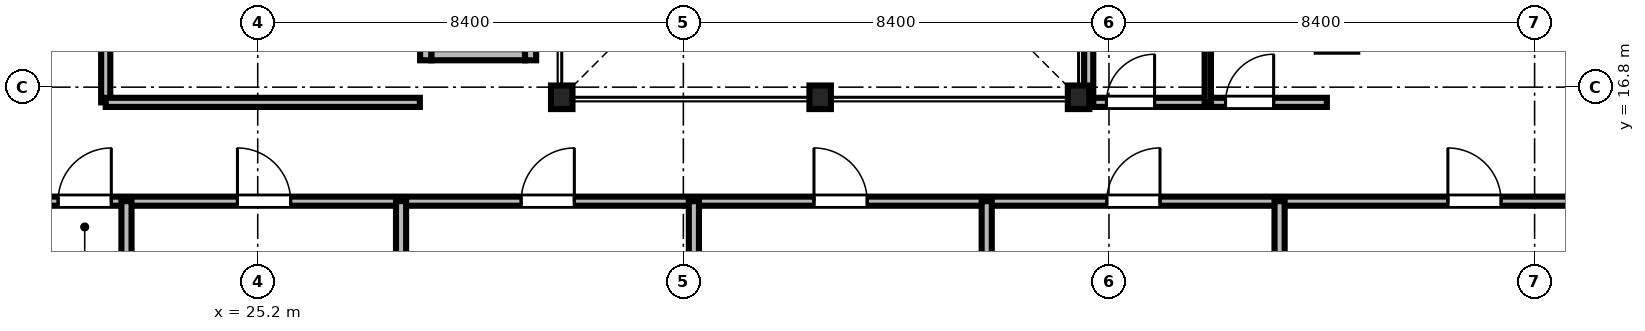
"""IFC4 building model, lengths in metres.
Left out: names, types, materials, properties, quantities, classifications, styles, units other than length and angle.
Written with IfcOpenShell. Run it as: python <this file> out.ifc"""

import sys

from ifc_helpers import new_model, si_unit, direction, frame, frame_2d, origin, origin_2d, place, context, subcontext, project, spatial, rectangle, i_section, extrude, source, transform, mapped, element, fill, save


model = new_model("IFC4")
c1 = context("Model", 3, precision=1e-05, world=origin(), true_north=direction((0.0, 1.0)))
c2 = subcontext(c1, "Body", "Model", "MODEL_VIEW")
j1 = project(units=[si_unit("LENGTHUNIT", "METRE"), si_unit("PLANEANGLEUNIT", "RADIAN")], contexts=[c1])
p1 = place(None, origin())
s1 = spatial("IfcSite", under=j1, at=p1, CompositionType="ELEMENT")
p2 = place(p1, origin())
s2 = spatial("IfcBuilding", under=s1, at=p2, CompositionType="ELEMENT")
p3 = place(p2, frame((0.0, 0.0, 148.3)))
s3 = spatial("IfcBuildingStorey", under=s2, at=p3, CompositionType="ELEMENT", Elevation=148.3)
m1 = source(origin(), c2, "Body", "SweptSolid", [
    extrude(i_section(OverallWidth=0.424, OverallDepth=0.465, WebThickness=0.035, FlangeThickness=0.056, FilletRadius=0.015, at=origin_2d()), origin(), (0.0, 0.0, 1.0), 3.46),
])
for number, where, z_axis, x_axis in (
    (1, (31.2, 16.6, 0.0), (0.0, 0.0, 1.0), (1.0, 0.0, 0.0)),
    (2, (36.3, 16.6, 0.0), (0.0, 0.0, 1.0), (1.0, 0.0, 0.0)),
    (3, (41.4, 16.6, 0.0), (0.0, 0.0, 1.0), (1.0, 0.0, 0.0)),
):
    element("IfcColumn", number, at=place(p3, frame(where, z_axis=z_axis, x_axis=x_axis)), inside=s3, PredefinedType="COLUMN", context=c2, shape_type="MappedRepresentation", body=[
        mapped(m1, transform((0.0, 0.0, 0.0), scale=1.0)),
    ])
m2 = source(origin(), c2, "Body", "SweptSolid", [
    extrude(rectangle(XDim=1.85, YDim=0.22, at=frame_2d((0.925, 0.0))), origin(), (0.0, 0.0, 1.0), 3.46),
])
p4 = place(p3, frame((28.625, 17.44, 0.0), z_axis=(0.0, 0.0, 1.0), x_axis=(1.0, 0.0, 0.0)))
e4 = element("IfcWall", 4, at=p4, inside=s3, PredefinedType="SOLIDWALL", context=c2, shape_type="MappedRepresentation", body=[
    mapped(m2, transform((0.0, 0.0, 0.0), scale=1.0)),
])
m3 = source(origin(), c2, "Body", "SweptSolid", [
    extrude(rectangle(XDim=2.54, YDim=0.22, at=frame_2d((1.27, 0.0))), origin(), (0.0, 0.0, 1.0), 3.46),
])
for number, where, z_axis, x_axis in (
    (5, (28.515, 17.33, 0.0), (0.0, 0.0, 1.0), (0.0, 1.0, 0.0)),
    (6, (30.585, 17.33, 0.0), (0.0, 0.0, 1.0), (0.0, 1.0, 0.0)),
):
    element("IfcWall", number, at=place(p3, frame(where, z_axis=z_axis, x_axis=x_axis)), inside=s3, PredefinedType="SOLIDWALL", context=c2, shape_type="MappedRepresentation", body=[
        mapped(m3, transform((0.0, 0.0, 0.0), scale=1.0)),
    ])
m4 = source(origin(), c2, "Body", "SweptSolid", [
    extrude(rectangle(XDim=46.156, YDim=0.18, at=frame_2d((23.078, 0.0))), origin(), (0.0, 0.0, 1.0), 2.702),
])
p5 = place(p3, frame((6.922, 14.55, 0.0), z_axis=(0.0, 0.0, 1.0), x_axis=(1.0, 0.0, 0.0)))
e7 = element("IfcWall", 7, at=p5, inside=s3, PredefinedType="PARTITIONING", context=c2, shape_type="MappedRepresentation", body=[
    mapped(m4, transform((0.0, 0.0, 0.0), scale=1.0)),
])
m5 = source(origin(), c2, "Body", "SweptSolid", [
    extrude(rectangle(XDim=1.05, YDim=2.2, at=frame_2d((0.525, 1.1))), frame((0.0, 0.1, 0.0), z_axis=(0.0, -1.0, 0.0), x_axis=(1.0, 0.0, 0.0)), (0.0, 0.0, 1.0), 0.2),
])
p6 = place(p5, frame((14.338, 0.0, 0.0)))
e8 = element("IfcOpeningElement", 8, at=p6, cuts=e7, PredefinedType="OPENING", context=c2, shape_type="MappedRepresentation", body=[
    mapped(m5, transform((0.0, 0.0, 0.0), scale=1.0)),
])
p7 = place(p5, frame((17.878, 0.0, 0.0)))
e9 = element("IfcOpeningElement", 9, at=p7, cuts=e7, PredefinedType="OPENING", context=c2, shape_type="MappedRepresentation", body=[
    mapped(m5, transform((0.0, 0.0, 0.0), scale=1.0)),
])
p8 = place(p5, frame((23.477, 0.0, 0.0)))
e10 = element("IfcOpeningElement", 10, at=p8, cuts=e7, PredefinedType="OPENING", context=c2, shape_type="MappedRepresentation", body=[
    mapped(m5, transform((0.0, 0.0, 0.0), scale=1.0)),
])
p9 = place(p5, frame((29.256, 0.0, 0.0)))
e11 = element("IfcOpeningElement", 11, at=p9, cuts=e7, PredefinedType="OPENING", context=c2, shape_type="MappedRepresentation", body=[
    mapped(m5, transform((0.0, 0.0, 0.0), scale=1.0)),
])
p10 = place(p5, frame((35.035, 0.0, 0.0)))
e12 = element("IfcOpeningElement", 12, at=p10, cuts=e7, PredefinedType="OPENING", context=c2, shape_type="MappedRepresentation", body=[
    mapped(m5, transform((0.0, 0.0, 0.0), scale=1.0)),
])
p11 = place(p5, frame((41.766, 0.0, 0.0)))
e13 = element("IfcOpeningElement", 13, at=p11, cuts=e7, PredefinedType="OPENING", context=c2, shape_type="MappedRepresentation", body=[
    mapped(m5, transform((0.0, 0.0, 0.0), scale=1.0)),
])
m6 = source(origin(), c2, "Body", "SweptSolid", [
    extrude(rectangle(XDim=4.7, YDim=0.18, at=frame_2d((2.35, 0.0))), origin(), (0.0, 0.0, 1.0), 2.852),
])
p12 = place(p3, frame((41.6, 16.5, 0.0), z_axis=(0.0, 0.0, 1.0), x_axis=(1.0, 0.0, 0.0)))
e14 = element("IfcWall", 14, at=p12, inside=s3, PredefinedType="PARTITIONING", context=c2, shape_type="MappedRepresentation", body=[
    mapped(m6, transform((0.0, 0.0, 0.0), scale=1.0)),
])
m7 = source(origin(), c2, "Body", "SweptSolid", [
    extrude(rectangle(XDim=0.95, YDim=2.15, at=frame_2d((0.475, 1.075))), frame((0.0, 0.1, 0.0), z_axis=(0.0, -1.0, 0.0), x_axis=(1.0, 0.0, 0.0)), (0.0, 0.0, 1.0), 0.2),
])
p13 = place(p12, frame((0.35, 0.0, 0.0)))
e15 = element("IfcOpeningElement", 15, at=p13, cuts=e14, PredefinedType="OPENING", context=c2, shape_type="MappedRepresentation", body=[
    mapped(m7, transform((0.0, 0.0, 0.0), scale=1.0)),
])
p14 = place(p12, frame((2.7, 0.0, 0.0)))
e16 = element("IfcOpeningElement", 16, at=p14, cuts=e14, PredefinedType="OPENING", context=c2, shape_type="MappedRepresentation", body=[
    mapped(m7, transform((0.0, 0.0, 0.0), scale=1.0)),
])
m8 = source(origin(), c2, "Body", "SweptSolid", [
    extrude(rectangle(XDim=3.55, YDim=0.18, at=frame_2d((1.775, 0.0))), origin(), (0.0, 0.0, 1.0), 2.852),
])
p15 = place(p3, frame((22.2, 16.5, 0.0), z_axis=(0.0, 0.0, 1.0), x_axis=(0.0, 1.0, 0.0)))
e17 = element("IfcWall", 17, at=p15, inside=s3, PredefinedType="PARTITIONING", context=c2, shape_type="MappedRepresentation", body=[
    mapped(m8, transform((0.0, 0.0, 0.0), scale=1.0)),
])
p16 = place(p15, frame((1.15, 0.0, 0.0)))
e18 = element("IfcOpeningElement", 18, at=p16, cuts=e17, PredefinedType="OPENING", context=c2, shape_type="MappedRepresentation", body=[
    mapped(m5, transform((0.0, 0.0, 0.0), scale=1.0)),
])
m9 = source(origin(), c2, "Body", "SweptSolid", [
    extrude(rectangle(XDim=12.428, YDim=0.2, at=frame_2d((6.214, 0.0))), origin(), (0.0, 0.0, 1.0), 2.702),
])
p17 = place(p3, frame((22.61, 2.122, 0.0), z_axis=(0.0, 0.0, 1.0), x_axis=(0.0, 1.0, 0.0)))
e19 = element("IfcWall", 19, at=p17, inside=s3, PredefinedType="PARTITIONING", context=c2, shape_type="MappedRepresentation", body=[
    mapped(m9, transform((0.0, 0.0, 0.0), scale=1.0)),
])
m10 = source(origin(), c2, "Body", "SweptSolid", [
    extrude(rectangle(XDim=12.62, YDim=0.2, at=frame_2d((6.31, 0.0))), origin(), (0.0, 0.0, 1.0), 2.702),
])
p18 = place(p3, frame((28.029, 1.93, 0.0), z_axis=(0.0, 0.0, 1.0), x_axis=(0.0, 1.0, 0.0)))
e20 = element("IfcWall", 20, at=p18, inside=s3, PredefinedType="PARTITIONING", context=c2, shape_type="MappedRepresentation", body=[
    mapped(m10, transform((0.0, 0.0, 0.0), scale=1.0)),
])
for number, where, z_axis, x_axis in (
    (21, (33.808, 2.122, 0.0), (0.0, 0.0, 1.0), (0.0, 1.0, 0.0)),
    (22, (39.587, 2.122, 0.0), (0.0, 0.0, 1.0), (0.0, 1.0, 0.0)),
    (23, (45.367, 2.122, 0.0), (0.0, 0.0, 1.0), (0.0, 1.0, 0.0)),
):
    element("IfcWall", number, at=place(p3, frame(where, z_axis=z_axis, x_axis=x_axis)), inside=s3, PredefinedType="PARTITIONING", context=c2, shape_type="MappedRepresentation", body=[
        mapped(m9, transform((0.0, 0.0, 0.0), scale=1.0)),
    ])
m11 = source(origin(), c2, "Body", "SweptSolid", [
    extrude(rectangle(XDim=7.15, YDim=0.18, at=frame_2d((3.575, 0.0))), origin(), (0.0, 0.0, 1.0), 2.852),
])
p19 = place(p3, frame((41.6, 16.5, 0.0), z_axis=(0.0, 0.0, 1.0), x_axis=(0.0, 1.0, 0.0)))
e24 = element("IfcWall", 24, at=p19, inside=s3, PredefinedType="PARTITIONING", context=c2, shape_type="MappedRepresentation", body=[
    mapped(m11, transform((0.0, 0.0, 0.0), scale=1.0)),
])
m12 = source(origin(), c2, "Body", "SweptSolid", [
    extrude(rectangle(XDim=7.15, YDim=0.125, at=frame_2d((3.575, 0.0))), origin(), (0.0, 0.0, 1.0), 2.852),
])
p20 = place(p3, frame((43.95, 16.5, 0.0), z_axis=(0.0, 0.0, 1.0), x_axis=(0.0, 1.0, 0.0)))
e25 = element("IfcWall", 25, at=p20, inside=s3, PredefinedType="PARTITIONING", context=c2, shape_type="MappedRepresentation", body=[
    mapped(m12, transform((0.0, 0.0, 0.0), scale=1.0)),
])
m13 = source(origin(), c2, "Body", "SweptSolid", [
    extrude(rectangle(XDim=6.2, YDim=0.18, at=frame_2d((3.1, 0.0))), origin(), (0.0, 0.0, 1.0), 3.46),
])
p21 = place(p3, frame((22.2, 16.5, 0.0), z_axis=(0.0, 0.0, 1.0), x_axis=(1.0, 0.0, 0.0)))
e26 = element("IfcWall", 26, at=p21, inside=s3, PredefinedType="PARTITIONING", context=c2, shape_type="MappedRepresentation", body=[
    mapped(m13, transform((0.0, 0.0, 0.0), scale=1.0)),
])
m14 = source(origin(), c2, "Body", "SweptSolid", [
    extrude(rectangle(XDim=1.05, YDim=2.2, at=frame_2d((0.525, 1.1))), frame((0.0, 0.025, 0.0), z_axis=(0.0, -1.0, 0.0), x_axis=(1.0, 0.0, 0.0)), (0.0, 0.0, 1.0), 0.05),
])
p22 = place(p6, origin())
e27 = element("IfcDoor", 27, at=p22, inside=s3, OperationType="SINGLE_SWING_RIGHT", PredefinedType="DOOR", context=c2, shape_type="MappedRepresentation", body=[
    mapped(m14, transform((0.0, 0.0, 0.0), scale=1.0)),
])
fill(e8, e27)
p23 = place(p7, origin())
e28 = element("IfcDoor", 28, at=p23, inside=s3, OperationType="SINGLE_SWING_LEFT", PredefinedType="DOOR", context=c2, shape_type="MappedRepresentation", body=[
    mapped(m14, transform((0.0, 0.0, 0.0), scale=1.0)),
])
fill(e9, e28)
p24 = place(p8, origin())
e29 = element("IfcDoor", 29, at=p24, inside=s3, OperationType="SINGLE_SWING_RIGHT", PredefinedType="DOOR", context=c2, shape_type="MappedRepresentation", body=[
    mapped(m14, transform((0.0, 0.0, 0.0), scale=1.0)),
])
fill(e10, e29)
p25 = place(p9, origin())
e30 = element("IfcDoor", 30, at=p25, inside=s3, OperationType="SINGLE_SWING_LEFT", PredefinedType="DOOR", context=c2, shape_type="MappedRepresentation", body=[
    mapped(m14, transform((0.0, 0.0, 0.0), scale=1.0)),
])
fill(e11, e30)
p26 = place(p10, origin())
e31 = element("IfcDoor", 31, at=p26, inside=s3, OperationType="SINGLE_SWING_RIGHT", PredefinedType="DOOR", context=c2, shape_type="MappedRepresentation", body=[
    mapped(m14, transform((0.0, 0.0, 0.0), scale=1.0)),
])
fill(e12, e31)
p27 = place(p11, origin())
e32 = element("IfcDoor", 32, at=p27, inside=s3, OperationType="SINGLE_SWING_LEFT", PredefinedType="DOOR", context=c2, shape_type="MappedRepresentation", body=[
    mapped(m14, transform((0.0, 0.0, 0.0), scale=1.0)),
])
fill(e13, e32)
m15 = source(origin(), c2, "Body", "SweptSolid", [
    extrude(rectangle(XDim=0.95, YDim=2.15, at=frame_2d((0.475, 1.075))), frame((0.0, 0.025, 0.0), z_axis=(0.0, -1.0, 0.0), x_axis=(1.0, 0.0, 0.0)), (0.0, 0.0, 1.0), 0.05),
])
p28 = place(p13, origin())
e33 = element("IfcDoor", 33, at=p28, inside=s3, OperationType="SINGLE_SWING_RIGHT", PredefinedType="DOOR", context=c2, shape_type="MappedRepresentation", body=[
    mapped(m15, transform((0.0, 0.0, 0.0), scale=1.0)),
])
fill(e15, e33)
p29 = place(p14, origin())
e34 = element("IfcDoor", 34, at=p29, inside=s3, OperationType="SINGLE_SWING_RIGHT", PredefinedType="DOOR", context=c2, shape_type="MappedRepresentation", body=[
    mapped(m15, transform((0.0, 0.0, 0.0), scale=1.0)),
])
fill(e16, e34)
save(model, sys.argv[1])
